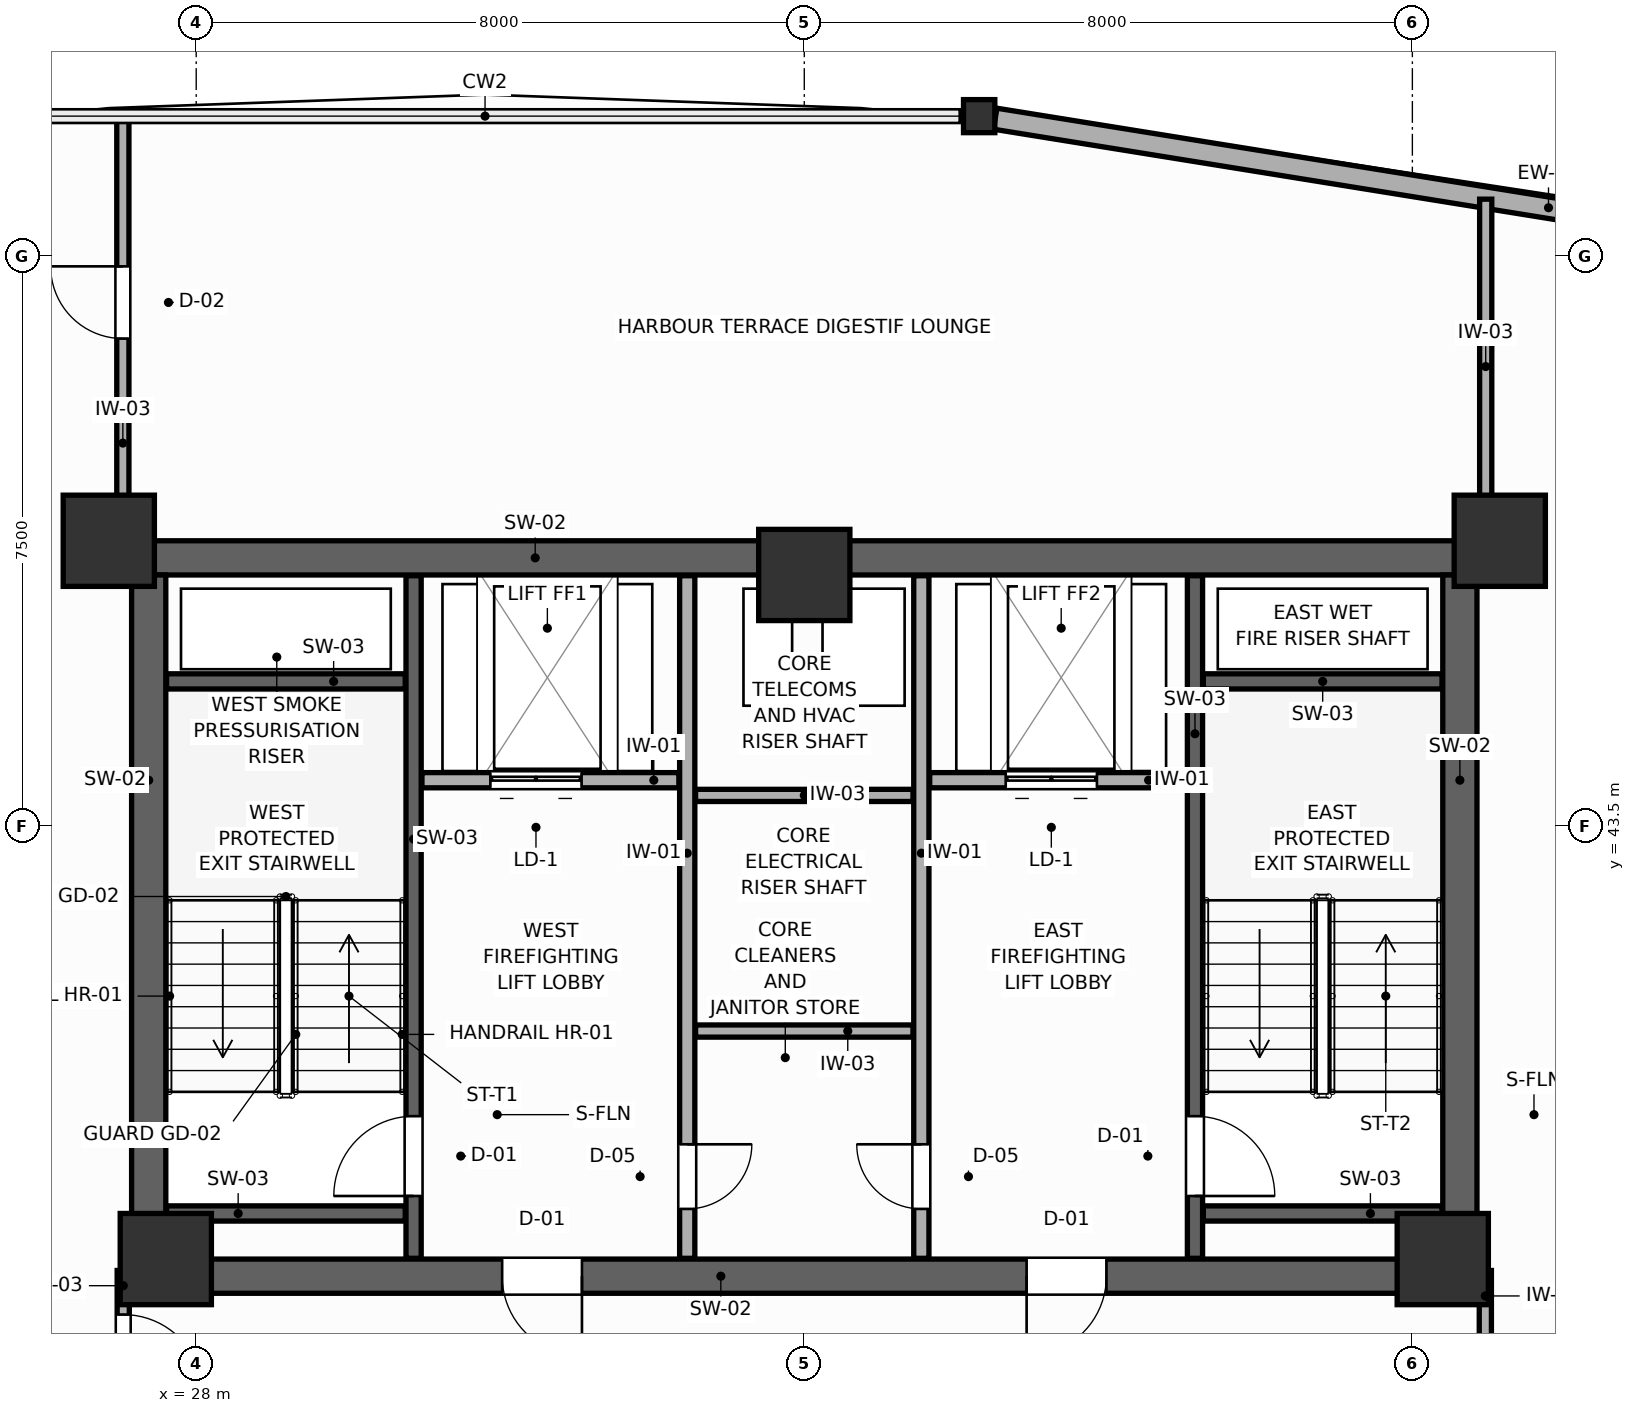
"""IFC4 building model, lengths in metres.
Left out: names, types, materials, properties, quantities, classifications, styles, units other than length and angle.
Written with IfcOpenShell. Run it as: python <this file> out.ifc"""

import sys

from ifc_helpers import new_model, si_unit, direction, frame, frame_2d, origin, origin_2d, place, context, subcontext, project, spatial, rectangle, i_section, extrude, source, transform, mapped, element, fill, save


model = new_model("IFC4")
c1 = context("Model", 3, precision=1e-05, world=origin(), true_north=direction((0.0, 1.0)))
c2 = subcontext(c1, "Body", "Model", "MODEL_VIEW")
j1 = project(units=[si_unit("LENGTHUNIT", "METRE"), si_unit("PLANEANGLEUNIT", "RADIAN")], contexts=[c1])
p1 = place(None, origin())
s1 = spatial("IfcSite", under=j1, at=p1, CompositionType="ELEMENT")
p2 = place(p1, origin())
s2 = spatial("IfcBuilding", under=s1, at=p2, CompositionType="ELEMENT")
p3 = place(p2, frame((0.0, 0.0, 154.2)))
s3 = spatial("IfcBuildingStorey", under=s2, at=p3, CompositionType="ELEMENT", Elevation=154.2)
p4 = place(p3, frame((27.15, 47.025, 0.0), z_axis=(0.0, 0.0, 1.0), x_axis=(1.0, 0.0, 0.0)))
e1 = element("IfcWall", 1, at=p4, inside=s3, PredefinedType="SHEAR", context=c2, shape_type="SweptSolid", body=[
    extrude(rectangle(XDim=17.7, YDim=0.45, at=frame_2d((8.85, 0.0))), origin(), (0.0, 0.0, 1.0), 3.6),
])
p5 = place(p3, frame((27.15, 37.575, 0.0), z_axis=(0.0, 0.0, 1.0), x_axis=(1.0, 0.0, 0.0)))
e2 = element("IfcWall", 2, at=p5, inside=s3, PredefinedType="SHEAR", context=c2, shape_type="SweptSolid", body=[
    extrude(rectangle(XDim=17.7, YDim=0.45, at=frame_2d((8.85, 0.0))), origin(), (0.0, 0.0, 1.0), 3.6),
])
p6 = place(p5, frame((4.875, 0.0, 0.0)))
e3 = element("IfcOpeningElement", 3, at=p6, cuts=e2, PredefinedType="OPENING", context=c2, shape_type="SweptSolid", body=[
    extrude(rectangle(XDim=1.05, YDim=2.1, at=frame_2d((0.525, 1.05))), frame((0.0, 0.235, 0.0), z_axis=(0.0, -1.0, 0.0), x_axis=(1.0, 0.0, 0.0)), (0.0, 0.0, 1.0), 0.47),
])
p7 = place(p5, frame((11.775, 0.0, 0.0)))
e4 = element("IfcOpeningElement", 4, at=p7, cuts=e2, PredefinedType="OPENING", context=c2, shape_type="SweptSolid", body=[
    extrude(rectangle(XDim=1.05, YDim=2.1, at=frame_2d((0.525, 1.05))), frame((0.0, 0.235, 0.0), z_axis=(0.0, -1.0, 0.0), x_axis=(1.0, 0.0, 0.0)), (0.0, 0.0, 1.0), 0.47),
])
for number, where, z_axis, x_axis in (
    (5, (27.375, 37.8, 0.0), (0.0, 0.0, 1.0), (0.0, 1.0, 0.0)),
    (6, (44.625, 37.8, 0.0), (0.0, 0.0, 1.0), (0.0, 1.0, 0.0)),
):
    element("IfcWall", number, at=place(p3, frame(where, z_axis=z_axis, x_axis=x_axis)), inside=s3, PredefinedType="SHEAR", context=c2, shape_type="SweptSolid", body=[
        extrude(rectangle(XDim=9.0, YDim=0.45, at=frame_2d((4.5, 0.0))), origin(), (0.0, 0.0, 1.0), 3.6),
    ])
m1 = source(origin(), c2, "Body", "SweptSolid", [
    extrude(rectangle(XDim=1.2, YDim=1.2, at=origin_2d()), origin(), (0.0, 0.0, 1.0), 3.6),
])
for number, where, z_axis, x_axis in (
    (7, (26.85, 47.25, 0.0), (0.0, 0.0, 1.0), (1.0, 0.0, 0.0)),
    (8, (45.15, 47.25, 0.0), (0.0, 0.0, 1.0), (1.0, 0.0, 0.0)),
    (9, (27.6, 37.8, 0.0), (0.0, 0.0, 1.0), (1.0, 0.0, 0.0)),
    (10, (44.4, 37.8, 0.0), (0.0, 0.0, 1.0), (1.0, 0.0, 0.0)),
    (11, (36.0, 46.8, 0.0), (0.0, 0.0, 1.0), (1.0, 0.0, 0.0)),
):
    element("IfcColumn", number, at=place(p3, frame(where, z_axis=z_axis, x_axis=x_axis)), inside=s3, PredefinedType="COLUMN", context=c2, shape_type="MappedRepresentation", body=[
        mapped(m1, transform((0.0, 0.0, 0.0), scale=1.0)),
    ])
m2 = source(origin(), c2, "Body", "SweptSolid", [
    extrude(i_section(OverallWidth=0.412, OverallDepth=0.435, WebThickness=0.033, FlangeThickness=0.053, FilletRadius=0.015, at=origin_2d()), origin(), (0.0, 0.0, 1.0), 3.6),
])
p8 = place(p3, frame((38.301, 52.836, 0.0), z_axis=(0.0, 0.0, 1.0), x_axis=(1.0, 0.0, 0.0)))
e12 = element("IfcColumn", 12, at=p8, inside=s3, PredefinedType="COLUMN", context=c2, shape_type="MappedRepresentation", body=[
    mapped(m2, transform((0.0, 0.0, 0.0), scale=1.0)),
])
p9 = place(p3, frame((53.07, 50.46, 0.0), z_axis=(0.0, 0.0, 1.0), x_axis=(-0.987303259595, 0.158846698404, 0.0)))
e13 = element("IfcWall", 13, at=p9, inside=s3, PredefinedType="SOLIDWALL", context=c2, shape_type="SweptSolid", body=[
    extrude(rectangle(XDim=14.746, YDim=0.28, at=frame_2d((7.373, 0.0))), origin(), (0.0, 0.0, 1.0), 1.87),
])
p10 = place(p3, frame((30.86, 37.81, 0.0), z_axis=(0.0, 0.0, 1.0), x_axis=(0.0, 1.0, 0.0)))
e14 = element("IfcWall", 14, at=p10, inside=s3, PredefinedType="SHEAR", context=c2, shape_type="SweptSolid", body=[
    extrude(rectangle(XDim=8.98, YDim=0.2, at=frame_2d((4.49, 0.0))), origin(), (0.0, 0.0, 1.0), 3.6),
])
p11 = place(p10, frame((0.82, 0.0, 0.0)))
e15 = element("IfcOpeningElement", 15, at=p11, cuts=e14, PredefinedType="OPENING", context=c2, shape_type="SweptSolid", body=[
    extrude(rectangle(XDim=1.05, YDim=2.1, at=frame_2d((0.525, 1.05))), frame((0.0, 0.11, 0.0), z_axis=(0.0, -1.0, 0.0), x_axis=(1.0, 0.0, 0.0)), (0.0, 0.0, 1.0), 0.22),
])
for number, where, z_axis, x_axis in (
    (16, (27.61, 45.4, 0.0), (0.0, 0.0, 1.0), (1.0, 0.0, 0.0)),
    (17, (27.61, 38.4, 0.0), (0.0, 0.0, 1.0), (1.0, 0.0, 0.0)),
):
    element("IfcWall", number, at=place(p3, frame(where, z_axis=z_axis, x_axis=x_axis)), inside=s3, PredefinedType="SHEAR", context=c2, shape_type="SweptSolid", body=[
        extrude(rectangle(XDim=3.14, YDim=0.2, at=frame_2d((1.57, 0.0))), origin(), (0.0, 0.0, 1.0), 3.6),
    ])
p12 = place(p3, frame((41.14, 37.81, 0.0), z_axis=(0.0, 0.0, 1.0), x_axis=(0.0, 1.0, 0.0)))
e18 = element("IfcWall", 18, at=p12, inside=s3, PredefinedType="SHEAR", context=c2, shape_type="SweptSolid", body=[
    extrude(rectangle(XDim=8.98, YDim=0.2, at=frame_2d((4.49, 0.0))), origin(), (0.0, 0.0, 1.0), 3.6),
])
p13 = place(p12, frame((0.82, 0.0, 0.0)))
e19 = element("IfcOpeningElement", 19, at=p13, cuts=e18, PredefinedType="OPENING", context=c2, shape_type="SweptSolid", body=[
    extrude(rectangle(XDim=1.05, YDim=2.1, at=frame_2d((0.525, 1.05))), frame((0.0, 0.11, 0.0), z_axis=(0.0, -1.0, 0.0), x_axis=(1.0, 0.0, 0.0)), (0.0, 0.0, 1.0), 0.22),
])
for number, where, z_axis, x_axis in (
    (20, (41.25, 45.4, 0.0), (0.0, 0.0, 1.0), (1.0, 0.0, 0.0)),
    (21, (41.25, 38.4, 0.0), (0.0, 0.0, 1.0), (1.0, 0.0, 0.0)),
):
    element("IfcWall", number, at=place(p3, frame(where, z_axis=z_axis, x_axis=x_axis)), inside=s3, PredefinedType="SHEAR", context=c2, shape_type="SweptSolid", body=[
        extrude(rectangle(XDim=3.14, YDim=0.2, at=frame_2d((1.57, 0.0))), origin(), (0.0, 0.0, 1.0), 3.6),
    ])
p14 = place(p3, frame((30.97, 44.1, 0.0), z_axis=(0.0, 0.0, 1.0), x_axis=(1.0, 0.0, 0.0)))
e22 = element("IfcWall", 22, at=p14, inside=s3, PredefinedType="PARTITIONING", context=c2, shape_type="SweptSolid", body=[
    extrude(rectangle(XDim=3.38, YDim=0.2, at=frame_2d((1.69, 0.0))), origin(), (0.0, 0.0, 1.0), 3.4),
])
p15 = place(p14, frame((0.9, 0.0, 0.0)))
e23 = element("IfcOpeningElement", 23, at=p15, cuts=e22, PredefinedType="OPENING", context=c2, shape_type="SweptSolid", body=[
    extrude(rectangle(XDim=1.2, YDim=2.1, at=frame_2d((0.6, 1.05))), frame((0.0, 0.11, 0.0), z_axis=(0.0, -1.0, 0.0), x_axis=(1.0, 0.0, 0.0)), (0.0, 0.0, 1.0), 0.22),
])
p16 = place(p3, frame((37.65, 44.1, 0.0), z_axis=(0.0, 0.0, 1.0), x_axis=(1.0, 0.0, 0.0)))
e24 = element("IfcWall", 24, at=p16, inside=s3, PredefinedType="PARTITIONING", context=c2, shape_type="SweptSolid", body=[
    extrude(rectangle(XDim=3.38, YDim=0.2, at=frame_2d((1.69, 0.0))), origin(), (0.0, 0.0, 1.0), 3.4),
])
p17 = place(p16, frame((1.0, 0.0, 0.0)))
e25 = element("IfcOpeningElement", 25, at=p17, cuts=e24, PredefinedType="OPENING", context=c2, shape_type="SweptSolid", body=[
    extrude(rectangle(XDim=1.2, YDim=2.1, at=frame_2d((0.6, 1.05))), frame((0.0, 0.11, 0.0), z_axis=(0.0, -1.0, 0.0), x_axis=(1.0, 0.0, 0.0)), (0.0, 0.0, 1.0), 0.22),
])
p18 = place(p3, frame((34.46, 37.81, 0.0), z_axis=(0.0, 0.0, 1.0), x_axis=(0.0, 1.0, 0.0)))
e26 = element("IfcWall", 26, at=p18, inside=s3, PredefinedType="PARTITIONING", context=c2, shape_type="SweptSolid", body=[
    extrude(rectangle(XDim=8.98, YDim=0.2, at=frame_2d((4.49, 0.0))), origin(), (0.0, 0.0, 1.0), 3.4),
])
p19 = place(p18, frame((0.65, 0.0, 0.0)))
e27 = element("IfcOpeningElement", 27, at=p19, cuts=e26, PredefinedType="OPENING", context=c2, shape_type="SweptSolid", body=[
    extrude(rectangle(XDim=0.85, YDim=2.05, at=frame_2d((0.425, 1.025))), frame((0.0, 0.11, 0.0), z_axis=(0.0, -1.0, 0.0), x_axis=(1.0, 0.0, 0.0)), (0.0, 0.0, 1.0), 0.22),
])
p20 = place(p3, frame((37.54, 37.81, 0.0), z_axis=(0.0, 0.0, 1.0), x_axis=(0.0, 1.0, 0.0)))
e28 = element("IfcWall", 28, at=p20, inside=s3, PredefinedType="PARTITIONING", context=c2, shape_type="SweptSolid", body=[
    extrude(rectangle(XDim=8.98, YDim=0.2, at=frame_2d((4.49, 0.0))), origin(), (0.0, 0.0, 1.0), 3.4),
])
p21 = place(p20, frame((0.65, 0.0, 0.0)))
e29 = element("IfcOpeningElement", 29, at=p21, cuts=e28, PredefinedType="OPENING", context=c2, shape_type="SweptSolid", body=[
    extrude(rectangle(XDim=0.85, YDim=2.05, at=frame_2d((0.425, 1.025))), frame((0.0, 0.11, 0.0), z_axis=(0.0, -1.0, 0.0), x_axis=(1.0, 0.0, 0.0)), (0.0, 0.0, 1.0), 0.22),
])
for number, where, z_axis, x_axis in (
    (30, (34.57, 40.8, 0.0), (0.0, 0.0, 1.0), (1.0, 0.0, 0.0)),
    (31, (34.57, 43.9, 0.0), (0.0, 0.0, 1.0), (1.0, 0.0, 0.0)),
):
    element("IfcWall", number, at=place(p3, frame(where, z_axis=z_axis, x_axis=x_axis)), inside=s3, PredefinedType="PARTITIONING", context=c2, shape_type="SweptSolid", body=[
        extrude(rectangle(XDim=2.86, YDim=0.16, at=frame_2d((1.43, 0.0))), origin(), (0.0, 0.0, 1.0), 3.4),
    ])
p22 = place(p3, frame((27.04, 35.54, 0.0), z_axis=(0.0, 0.0, 1.0), x_axis=(0.0, 1.0, 0.0)))
e32 = element("IfcWall", 32, at=p22, inside=s3, PredefinedType="PARTITIONING", context=c2, shape_type="SweptSolid", body=[
    extrude(rectangle(XDim=2.11, YDim=0.16, at=frame_2d((1.055, 0.0))), origin(), (0.0, 0.0, 1.0), 3.4),
])
p23 = place(p22, frame((0.48, 0.0, 0.0)))
e33 = element("IfcOpeningElement", 33, at=p23, cuts=e32, PredefinedType="OPENING", context=c2, shape_type="SweptSolid", body=[
    extrude(rectangle(XDim=1.05, YDim=2.1, at=frame_2d((0.525, 1.05))), frame((0.0, 0.09, 0.0), z_axis=(0.0, -1.0, 0.0), x_axis=(1.0, 0.0, 0.0)), (0.0, 0.0, 1.0), 0.18),
])
p24 = place(p3, frame((44.96, 35.0, 0.0), z_axis=(0.0, 0.0, 1.0), x_axis=(0.0, 1.0, 0.0)))
e34 = element("IfcWall", 34, at=p24, inside=s3, PredefinedType="PARTITIONING", context=c2, shape_type="SweptSolid", body=[
    extrude(rectangle(XDim=2.65, YDim=0.16, at=frame_2d((1.325, 0.0))), origin(), (0.0, 0.0, 1.0), 3.4),
])
p25 = place(p24, frame((0.75, 0.0, 0.0)))
e35 = element("IfcOpeningElement", 35, at=p25, cuts=e34, PredefinedType="OPENING", context=c2, shape_type="SweptSolid", body=[
    extrude(rectangle(XDim=1.05, YDim=2.1, at=frame_2d((0.525, 1.05))), frame((0.0, 0.09, 0.0), z_axis=(0.0, -1.0, 0.0), x_axis=(1.0, 0.0, 0.0)), (0.0, 0.0, 1.0), 0.18),
])
p26 = place(p3, frame((27.035, 47.34, 0.0), z_axis=(0.0, 0.0, 1.0), x_axis=(0.0, 1.0, 0.0)))
e36 = element("IfcWall", 36, at=p26, inside=s3, PredefinedType="PARTITIONING", context=c2, shape_type="SweptSolid", body=[
    extrude(rectangle(XDim=5.476, YDim=0.16, at=frame_2d((2.738, 0.0))), origin(), (0.0, 0.0, 1.0), 2.16),
])
p27 = place(p26, frame((2.57, 0.0, 0.0)))
e37 = element("IfcOpeningElement", 37, at=p27, cuts=e36, PredefinedType="OPENING", context=c2, shape_type="SweptSolid", body=[
    extrude(rectangle(XDim=0.95, YDim=2.05, at=frame_2d((0.475, 1.025))), frame((0.0, 0.09, 0.0), z_axis=(0.0, -1.0, 0.0), x_axis=(1.0, 0.0, 0.0)), (0.0, 0.0, 1.0), 0.18),
])
p28 = place(p3, frame((44.965, 47.34, 0.0), z_axis=(0.0, 0.0, 1.0), x_axis=(0.0, 1.0, 0.0)))
e38 = element("IfcWall", 38, at=p28, inside=s3, PredefinedType="PARTITIONING", context=c2, shape_type="SweptSolid", body=[
    extrude(rectangle(XDim=4.404, YDim=0.16, at=frame_2d((2.202, 0.0))), origin(), (0.0, 0.0, 1.0), 3.4),
])
p29 = place(p11, origin())
e39 = element("IfcDoor", 39, at=p29, inside=s3, OperationType="SINGLE_SWING_LEFT", PredefinedType="DOOR", context=c2, shape_type="SweptSolid", body=[
    extrude(rectangle(XDim=1.05, YDim=2.1, at=frame_2d((0.525, 1.05))), frame((0.0, 0.025, 0.0), z_axis=(0.0, -1.0, 0.0), x_axis=(1.0, 0.0, 0.0)), (0.0, 0.0, 1.0), 0.05),
])
fill(e15, e39)
p30 = place(p13, frame((1.05, 0.0, 0.0), z_axis=(0.0, 0.0, 1.0), x_axis=(-1.0, 0.0, 0.0)))
e40 = element("IfcDoor", 40, at=p30, inside=s3, OperationType="SINGLE_SWING_RIGHT", PredefinedType="DOOR", context=c2, shape_type="SweptSolid", body=[
    extrude(rectangle(XDim=1.05, YDim=2.1, at=frame_2d((0.525, 1.05))), frame((0.0, 0.025, 0.0), z_axis=(0.0, -1.0, 0.0), x_axis=(1.0, 0.0, 0.0)), (0.0, 0.0, 1.0), 0.05),
])
fill(e19, e40)
p31 = place(p15, origin())
e41 = element("IfcDoor", 41, at=p31, inside=s3, OperationType="DOUBLE_DOOR_SLIDING", PredefinedType="DOOR", context=c2, shape_type="SweptSolid", body=[
    extrude(rectangle(XDim=1.2, YDim=2.1, at=frame_2d((0.6, 1.05))), frame((0.0, 0.025, 0.0), z_axis=(0.0, -1.0, 0.0), x_axis=(1.0, 0.0, 0.0)), (0.0, 0.0, 1.0), 0.05),
])
fill(e23, e41)
p32 = place(p17, origin())
e42 = element("IfcDoor", 42, at=p32, inside=s3, OperationType="DOUBLE_DOOR_SLIDING", PredefinedType="DOOR", context=c2, shape_type="SweptSolid", body=[
    extrude(rectangle(XDim=1.2, YDim=2.1, at=frame_2d((0.6, 1.05))), frame((0.0, 0.025, 0.0), z_axis=(0.0, -1.0, 0.0), x_axis=(1.0, 0.0, 0.0)), (0.0, 0.0, 1.0), 0.05),
])
fill(e25, e42)
p33 = place(p19, frame((0.85, 0.0, 0.0), z_axis=(0.0, 0.0, 1.0), x_axis=(-1.0, 0.0, 0.0)))
e43 = element("IfcDoor", 43, at=p33, inside=s3, OperationType="SINGLE_SWING_LEFT", PredefinedType="DOOR", context=c2, shape_type="SweptSolid", body=[
    extrude(rectangle(XDim=0.85, YDim=2.05, at=frame_2d((0.425, 1.025))), frame((0.0, 0.025, 0.0), z_axis=(0.0, -1.0, 0.0), x_axis=(1.0, 0.0, 0.0)), (0.0, 0.0, 1.0), 0.05),
])
fill(e27, e43)
p34 = place(p21, origin())
e44 = element("IfcDoor", 44, at=p34, inside=s3, OperationType="SINGLE_SWING_RIGHT", PredefinedType="DOOR", context=c2, shape_type="SweptSolid", body=[
    extrude(rectangle(XDim=0.85, YDim=2.05, at=frame_2d((0.425, 1.025))), frame((0.0, 0.025, 0.0), z_axis=(0.0, -1.0, 0.0), x_axis=(1.0, 0.0, 0.0)), (0.0, 0.0, 1.0), 0.05),
])
fill(e29, e44)
p35 = place(p23, frame((1.05, 0.0, 0.0), z_axis=(0.0, 0.0, 1.0), x_axis=(-1.0, 0.0, 0.0)))
e45 = element("IfcDoor", 45, at=p35, inside=s3, OperationType="SINGLE_SWING_RIGHT", PredefinedType="DOOR", context=c2, shape_type="SweptSolid", body=[
    extrude(rectangle(XDim=1.05, YDim=2.1, at=frame_2d((0.525, 1.05))), frame((0.0, 0.025, 0.0), z_axis=(0.0, -1.0, 0.0), x_axis=(1.0, 0.0, 0.0)), (0.0, 0.0, 1.0), 0.05),
])
fill(e33, e45)
p36 = place(p27, origin())
e46 = element("IfcDoor", 46, at=p36, inside=s3, OperationType="SINGLE_SWING_RIGHT", PredefinedType="DOOR", context=c2, shape_type="SweptSolid", body=[
    extrude(rectangle(XDim=0.95, YDim=2.05, at=frame_2d((0.475, 1.025))), frame((0.0, 0.025, 0.0), z_axis=(0.0, -1.0, 0.0), x_axis=(1.0, 0.0, 0.0)), (0.0, 0.0, 1.0), 0.05),
])
fill(e37, e46)
p37 = place(p6, frame((1.05, 0.0, 0.0), z_axis=(0.0, 0.0, 1.0), x_axis=(-1.0, 0.0, 0.0)))
e47 = element("IfcDoor", 47, at=p37, inside=s3, OperationType="SINGLE_SWING_LEFT", PredefinedType="DOOR", context=c2, shape_type="SweptSolid", body=[
    extrude(rectangle(XDim=1.05, YDim=2.1, at=frame_2d((0.525, 1.05))), frame((0.0, 0.025, 0.0), z_axis=(0.0, -1.0, 0.0), x_axis=(1.0, 0.0, 0.0)), (0.0, 0.0, 1.0), 0.05),
])
fill(e3, e47)
p38 = place(p7, frame((1.05, 0.0, 0.0), z_axis=(0.0, 0.0, 1.0), x_axis=(-1.0, 0.0, 0.0)))
e48 = element("IfcDoor", 48, at=p38, inside=s3, OperationType="SINGLE_SWING_RIGHT", PredefinedType="DOOR", context=c2, shape_type="SweptSolid", body=[
    extrude(rectangle(XDim=1.05, YDim=2.1, at=frame_2d((0.525, 1.05))), frame((0.0, 0.025, 0.0), z_axis=(0.0, -1.0, 0.0), x_axis=(1.0, 0.0, 0.0)), (0.0, 0.0, 1.0), 0.05),
])
fill(e4, e48)
save(model, sys.argv[1])
